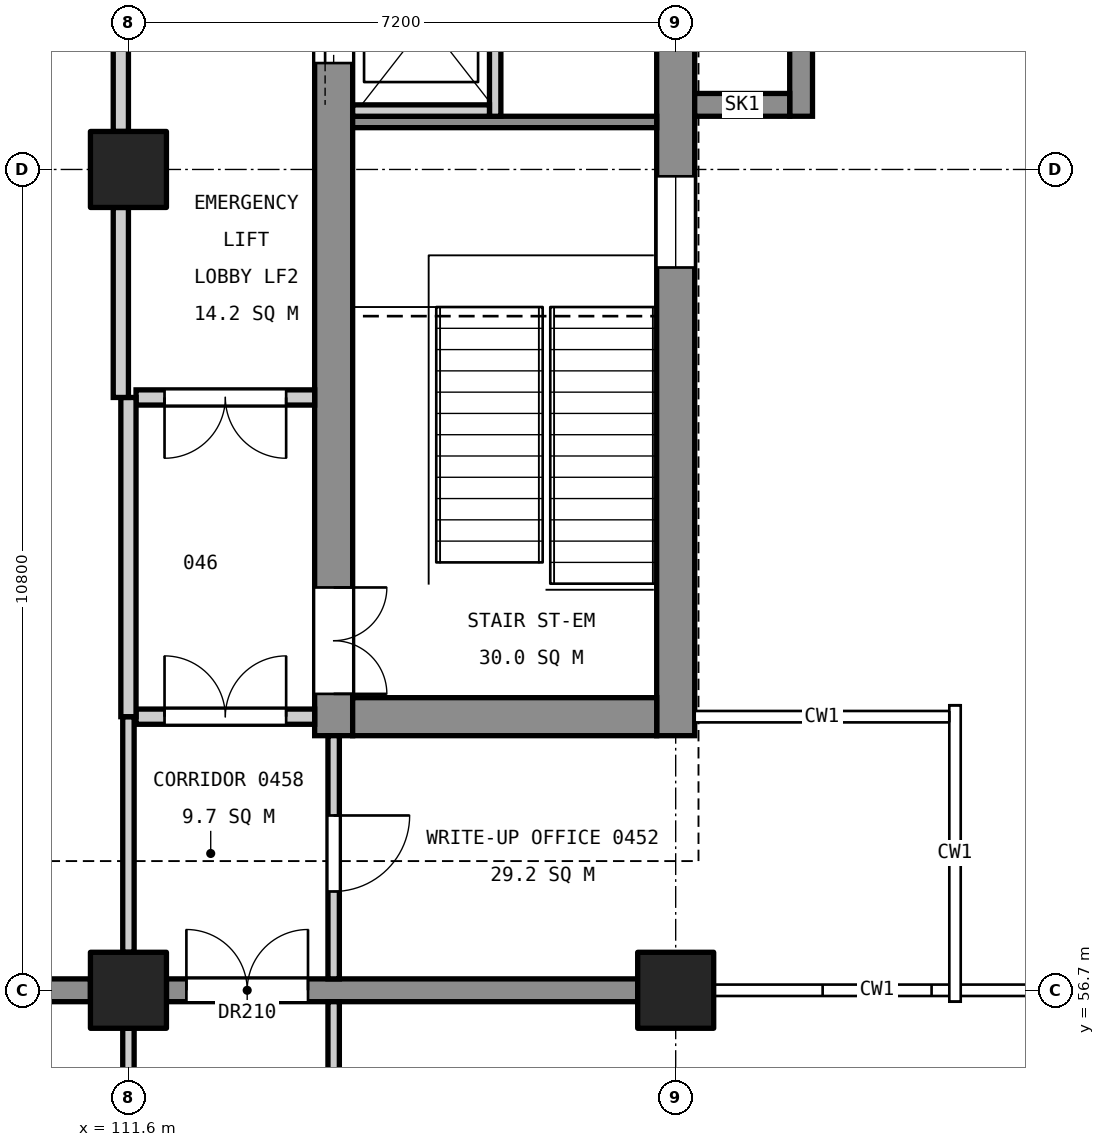
"""IFC4 building model, lengths in metres.
Left out: names, types, materials, properties, quantities, classifications, styles, units other than length and angle.
Written with IfcOpenShell. Run it as: python <this file> out.ifc"""

import sys

from ifc_helpers import new_model, si_unit, direction, frame, frame_2d, origin, origin_2d, place, context, subcontext, project, spatial, rectangle, extrude, element, fill, save


model = new_model("IFC4")
c1 = context("Model", 3, precision=1e-05, world=origin(), true_north=direction((0.0, 1.0)))
c2 = subcontext(c1, "Body", "Model", "MODEL_VIEW")
j1 = project(units=[si_unit("LENGTHUNIT", "METRE"), si_unit("PLANEANGLEUNIT", "RADIAN")], contexts=[c1])
p1 = place(None, origin())
s1 = spatial("IfcSite", under=j1, at=p1, CompositionType="ELEMENT")
p2 = place(p1, origin())
s2 = spatial("IfcBuilding", under=s1, at=p2, CompositionType="ELEMENT")
p3 = place(p2, frame((0.0, 0.0, 22.2)))
s3 = spatial("IfcBuildingStorey", under=s2, at=p3, CompositionType="ELEMENT", Elevation=22.2)
for number, where, z_axis, x_axis in (
    (1, (118.8, 56.7, 0.0), (0.0, 0.0, 1.0), (1.0, 0.0, 0.0)),
    (2, (111.6, 56.7, 0.0), (0.0, 0.0, 1.0), (1.0, 0.0, 0.0)),
    (3, (111.6, 67.5, 0.0), (0.0, 0.0, 1.0), (1.0, 0.0, 0.0)),
):
    element("IfcColumn", number, at=place(p3, frame(where, z_axis=z_axis, x_axis=x_axis)), inside=s3, PredefinedType="COLUMN", context=c2, shape_type="SweptSolid", body=[
        extrude(rectangle(XDim=1.0, YDim=1.0, at=origin_2d()), origin(), (0.0, 0.0, 1.0), 4.8),
    ])
p4 = place(p3, frame((118.8, 60.05, 0.0), z_axis=(0.0, 0.0, 1.0), x_axis=(0.0, 1.0, 0.0)))
e4 = element("IfcWall", 4, at=p4, inside=s3, PredefinedType="SHEAR", context=c2, shape_type="SweptSolid", body=[
    extrude(rectangle(XDim=14.9, YDim=0.5, at=frame_2d((7.45, 0.0))), origin(), (0.0, 0.0, 1.0), 4.55),
])
p5 = place(p4, frame((6.16, 0.0, 3.4)))
e5 = element("IfcOpeningElement", 5, at=p5, cuts=e4, PredefinedType="OPENING", context=c2, shape_type="SweptSolid", body=[
    extrude(rectangle(XDim=1.2, YDim=0.9, at=frame_2d((0.6, 0.45))), frame((0.0, 0.26, 0.0), z_axis=(0.0, -1.0, 0.0), x_axis=(1.0, 0.0, 0.0)), (0.0, 0.0, 1.0), 0.52),
])
p6 = place(p3, frame((114.3, 60.05, 0.0), z_axis=(0.0, 0.0, 1.0), x_axis=(0.0, 1.0, 0.0)))
e6 = element("IfcWall", 6, at=p6, inside=s3, PredefinedType="SHEAR", context=c2, shape_type="SweptSolid", body=[
    extrude(rectangle(XDim=14.9, YDim=0.5, at=frame_2d((7.45, 0.0))), origin(), (0.0, 0.0, 1.0), 4.55),
])
p7 = place(p6, frame((0.55, 0.0, 0.0)))
e7 = element("IfcOpeningElement", 7, at=p7, cuts=e6, PredefinedType="OPENING", context=c2, shape_type="SweptSolid", body=[
    extrude(rectangle(XDim=1.4, YDim=2.1, at=frame_2d((0.7, 1.05))), frame((0.0, 0.26, 0.0), z_axis=(0.0, -1.0, 0.0), x_axis=(1.0, 0.0, 0.0)), (0.0, 0.0, 1.0), 0.52),
])
p8 = place(p6, frame((8.85, 0.0, 0.0)))
e8 = element("IfcOpeningElement", 8, at=p8, cuts=e6, PredefinedType="OPENING", context=c2, shape_type="SweptSolid", body=[
    extrude(rectangle(XDim=1.1, YDim=2.1, at=frame_2d((0.55, 1.05))), frame((0.0, 0.26, 0.0), z_axis=(0.0, -1.0, 0.0), x_axis=(1.0, 0.0, 0.0)), (0.0, 0.0, 1.0), 0.52),
])
p9 = place(p6, frame((11.4, 0.0, 0.0)))
e9 = element("IfcOpeningElement", 9, at=p9, cuts=e6, PredefinedType="OPENING", context=c2, shape_type="SweptSolid", body=[
    extrude(rectangle(XDim=1.1, YDim=2.1, at=frame_2d((0.55, 1.05))), frame((0.0, 0.26, 0.0), z_axis=(0.0, -1.0, 0.0), x_axis=(1.0, 0.0, 0.0)), (0.0, 0.0, 1.0), 0.52),
])
p10 = place(p3, frame((118.55, 60.3, 0.0), z_axis=(0.0, 0.0, 1.0), x_axis=(-1.0, 0.0, 0.0)))
e10 = element("IfcWall", 10, at=p10, inside=s3, PredefinedType="SHEAR", context=c2, shape_type="SweptSolid", body=[
    extrude(rectangle(XDim=4.0, YDim=0.5, at=frame_2d((2.0, 0.0))), origin(), (0.0, 0.0, 1.0), 4.55),
])
p11 = place(p3, frame((120.45, 68.2, 0.0), z_axis=(0.0, 0.0, 1.0), x_axis=(0.0, 1.0, 0.0)))
e11 = element("IfcWall", 11, at=p11, inside=s3, PredefinedType="SHEAR", context=c2, shape_type="SweptSolid", body=[
    extrude(rectangle(XDim=5.1, YDim=0.3, at=frame_2d((2.55, 0.0))), origin(), (0.0, 0.0, 1.0), 4.8),
])
p12 = place(p11, frame((1.65, 0.0, 3.0)))
e12 = element("IfcOpeningElement", 12, at=p12, cuts=e11, PredefinedType="OPENING", context=c2, shape_type="SweptSolid", body=[
    extrude(rectangle(XDim=1.8, YDim=1.2, at=frame_2d((0.9, 0.6))), frame((0.0, 0.16, 0.0), z_axis=(0.0, -1.0, 0.0), x_axis=(1.0, 0.0, 0.0)), (0.0, 0.0, 1.0), 0.32),
])
p13 = place(p3, frame((119.05, 68.35, 0.0), z_axis=(0.0, 0.0, 1.0), x_axis=(1.0, 0.0, 0.0)))
e13 = element("IfcWall", 13, at=p13, inside=s3, PredefinedType="SHEAR", context=c2, shape_type="SweptSolid", body=[
    extrude(rectangle(XDim=1.25, YDim=0.3, at=frame_2d((0.625, 0.0))), origin(), (0.0, 0.0, 1.0), 4.8),
])
p14 = place(p3, frame((118.3, 56.7, 0.0), z_axis=(0.0, 0.0, 1.0), x_axis=(-1.0, 0.0, 0.0)))
e14 = element("IfcWall", 14, at=p14, inside=s3, PredefinedType="SHEAR", context=c2, shape_type="SweptSolid", body=[
    extrude(rectangle(XDim=6.2, YDim=0.3, at=frame_2d((3.1, 0.0))), origin(), (0.0, 0.0, 1.0), 4.55),
])
p15 = place(p14, frame((4.337, 0.0, 0.0)))
e15 = element("IfcOpeningElement", 15, at=p15, cuts=e14, PredefinedType="OPENING", context=c2, shape_type="SweptSolid", body=[
    extrude(rectangle(XDim=1.6, YDim=2.1, at=frame_2d((0.8, 1.05))), frame((0.0, 0.16, 0.0), z_axis=(0.0, -1.0, 0.0), x_axis=(1.0, 0.0, 0.0)), (0.0, 0.0, 1.0), 0.32),
])
p16 = place(p3, frame((111.1, 56.7, 0.0), z_axis=(0.0, 0.0, 1.0), x_axis=(-1.0, 0.0, 0.0)))
e16 = element("IfcWall", 16, at=p16, inside=s3, PredefinedType="SHEAR", context=c2, shape_type="SweptSolid", body=[
    extrude(rectangle(XDim=9.8, YDim=0.3, at=frame_2d((4.9, 0.0))), origin(), (0.0, 0.0, 1.0), 4.55),
])
p17 = place(p3, frame((118.55, 68.125, 0.0), z_axis=(0.0, 0.0, 1.0), x_axis=(-1.0, 0.0, 0.0)))
e17 = element("IfcWall", 17, at=p17, inside=s3, PredefinedType="SOLIDWALL", context=c2, shape_type="SweptSolid", body=[
    extrude(rectangle(XDim=4.0, YDim=0.15, at=frame_2d((2.0, 0.0))), origin(), (0.0, 0.0, 1.0), 4.55),
])
p18 = place(p3, frame((116.425, 68.2, 0.0), z_axis=(0.0, 0.0, 1.0), x_axis=(0.0, 1.0, 0.0)))
e18 = element("IfcWall", 18, at=p18, inside=s3, PredefinedType="SOLIDWALL", context=c2, shape_type="SweptSolid", body=[
    extrude(rectangle(XDim=2.5, YDim=0.15, at=frame_2d((1.25, 0.0))), origin(), (0.0, 0.0, 1.0), 4.8),
])
p19 = place(p3, frame((116.35, 68.275, 0.0), z_axis=(0.0, 0.0, 1.0), x_axis=(-1.0, 0.0, 0.0)))
e19 = element("IfcWall", 19, at=p19, inside=s3, PredefinedType="SOLIDWALL", context=c2, shape_type="SweptSolid", body=[
    extrude(rectangle(XDim=1.8, YDim=0.15, at=frame_2d((0.9, 0.0))), origin(), (0.0, 0.0, 1.0), 4.8),
])
p20 = place(p3, frame((114.3, 46.15, 0.0), z_axis=(0.0, 0.0, 1.0), x_axis=(0.0, 1.0, 0.0)))
e20 = element("IfcWall", 20, at=p20, inside=s3, PredefinedType="PARTITIONING", context=c2, shape_type="SweptSolid", body=[
    extrude(rectangle(XDim=10.4, YDim=0.15, at=frame_2d((5.2, 0.0))), origin(), (0.0, 0.0, 1.0), 3.55),
])
p21 = place(p20, frame((4.65, 0.0, 0.0)))
e21 = element("IfcOpeningElement", 21, at=p21, cuts=e20, PredefinedType="OPENING", context=c2, shape_type="SweptSolid", body=[
    extrude(rectangle(XDim=1.0, YDim=2.1, at=frame_2d((0.5, 1.05))), frame((0.0, 0.085, 0.0), z_axis=(0.0, -1.0, 0.0), x_axis=(1.0, 0.0, 0.0)), (0.0, 0.0, 1.0), 0.17),
])
p22 = place(p3, frame((114.3, 56.85, 0.0), z_axis=(0.0, 0.0, 1.0), x_axis=(0.0, 1.0, 0.0)))
e22 = element("IfcWall", 22, at=p22, inside=s3, PredefinedType="PARTITIONING", context=c2, shape_type="SweptSolid", body=[
    extrude(rectangle(XDim=3.2, YDim=0.15, at=frame_2d((1.6, 0.0))), origin(), (0.0, 0.0, 1.0), 3.55),
])
p23 = place(p22, frame((1.15, 0.0, 0.0)))
e23 = element("IfcOpeningElement", 23, at=p23, cuts=e22, PredefinedType="OPENING", context=c2, shape_type="SweptSolid", body=[
    extrude(rectangle(XDim=1.0, YDim=2.1, at=frame_2d((0.5, 1.05))), frame((0.0, 0.085, 0.0), z_axis=(0.0, -1.0, 0.0), x_axis=(1.0, 0.0, 0.0)), (0.0, 0.0, 1.0), 0.17),
])
p24 = place(p3, frame((114.05, 60.3, 0.0), z_axis=(0.0, 0.0, 1.0), x_axis=(-1.0, 0.0, 0.0)))
e24 = element("IfcWall", 24, at=p24, inside=s3, PredefinedType="PARTITIONING", context=c2, shape_type="SweptSolid", body=[
    extrude(rectangle(XDim=2.35, YDim=0.2, at=frame_2d((1.175, 0.0))), origin(), (0.0, 0.0, 1.0), 3.85),
])
p25 = place(p24, frame((0.375, 0.0, 0.0)))
e25 = element("IfcOpeningElement", 25, at=p25, cuts=e24, PredefinedType="OPENING", context=c2, shape_type="SweptSolid", body=[
    extrude(rectangle(XDim=1.6, YDim=2.1, at=frame_2d((0.8, 1.05))), frame((0.0, 0.11, 0.0), z_axis=(0.0, -1.0, 0.0), x_axis=(1.0, 0.0, 0.0)), (0.0, 0.0, 1.0), 0.22),
])
p26 = place(p3, frame((114.05, 64.5, 0.0), z_axis=(0.0, 0.0, 1.0), x_axis=(-1.0, 0.0, 0.0)))
e26 = element("IfcWall", 26, at=p26, inside=s3, PredefinedType="PARTITIONING", context=c2, shape_type="SweptSolid", body=[
    extrude(rectangle(XDim=2.35, YDim=0.2, at=frame_2d((1.175, 0.0))), origin(), (0.0, 0.0, 1.0), 3.55),
])
p27 = place(p26, frame((0.375, 0.0, 0.0)))
e27 = element("IfcOpeningElement", 27, at=p27, cuts=e26, PredefinedType="OPENING", context=c2, shape_type="SweptSolid", body=[
    extrude(rectangle(XDim=1.6, YDim=2.1, at=frame_2d((0.8, 1.05))), frame((0.0, 0.11, 0.0), z_axis=(0.0, -1.0, 0.0), x_axis=(1.0, 0.0, 0.0)), (0.0, 0.0, 1.0), 0.22),
])
p28 = place(p3, frame((111.6, 46.4, 0.0), z_axis=(0.0, 0.0, 1.0), x_axis=(0.0, 1.0, 0.0)))
e28 = element("IfcWall", 28, at=p28, inside=s3, PredefinedType="PARTITIONING", context=c2, shape_type="SweptSolid", body=[
    extrude(rectangle(XDim=9.8, YDim=0.15, at=frame_2d((4.9, 0.0))), origin(), (0.0, 0.0, 1.0), 3.55),
])
p29 = place(p28, frame((4.3, 0.0, 0.0)))
e29 = element("IfcOpeningElement", 29, at=p29, cuts=e28, PredefinedType="OPENING", context=c2, shape_type="SweptSolid", body=[
    extrude(rectangle(XDim=1.2, YDim=2.1, at=frame_2d((0.6, 1.05))), frame((0.0, 0.085, 0.0), z_axis=(0.0, -1.0, 0.0), x_axis=(1.0, 0.0, 0.0)), (0.0, 0.0, 1.0), 0.17),
])
p30 = place(p3, frame((111.6, 57.2, 0.0), z_axis=(0.0, 0.0, 1.0), x_axis=(0.0, 1.0, 0.0)))
e30 = element("IfcWall", 30, at=p30, inside=s3, PredefinedType="PARTITIONING", context=c2, shape_type="SweptSolid", body=[
    extrude(rectangle(XDim=3.1, YDim=0.15, at=frame_2d((1.55, 0.0))), origin(), (0.0, 0.0, 1.0), 3.55),
])
p31 = place(p3, frame((111.6, 60.3, 0.0), z_axis=(0.0, 0.0, 1.0), x_axis=(0.0, 1.0, 0.0)))
e31 = element("IfcWall", 31, at=p31, inside=s3, PredefinedType="PARTITIONING", context=c2, shape_type="SweptSolid", body=[
    extrude(rectangle(XDim=4.2, YDim=0.2, at=frame_2d((2.1, 0.0))), origin(), (0.0, 0.0, 1.0), 3.55),
])
p32 = place(p3, frame((111.5, 64.5, 0.0), z_axis=(0.0, 0.0, 1.0), x_axis=(0.0, 1.0, 0.0)))
e32 = element("IfcWall", 32, at=p32, inside=s3, PredefinedType="PARTITIONING", context=c2, shape_type="SweptSolid", body=[
    extrude(rectangle(XDim=2.5, YDim=0.2, at=frame_2d((1.25, 0.0))), origin(), (0.0, 0.0, 1.0), 3.55),
])
p33 = place(p3, frame((111.5, 68.0, 0.0), z_axis=(0.0, 0.0, 1.0), x_axis=(0.0, 1.0, 0.0)))
e33 = element("IfcWall", 33, at=p33, inside=s3, PredefinedType="PARTITIONING", context=c2, shape_type="SweptSolid", body=[
    extrude(rectangle(XDim=2.8, YDim=0.2, at=frame_2d((1.4, 0.0))), origin(), (0.0, 0.0, 1.0), 3.55),
])
p34 = place(p7, frame((1.4, 0.0, 0.0), z_axis=(0.0, 0.0, 1.0), x_axis=(-1.0, 0.0, 0.0)))
e34 = element("IfcDoor", 34, at=p34, inside=s3, OperationType="DOUBLE_DOOR_SINGLE_SWING", PredefinedType="DOOR", context=c2, shape_type="SweptSolid", body=[
    extrude(rectangle(XDim=1.4, YDim=2.1, at=frame_2d((0.7, 1.05))), frame((0.0, 0.025, 0.0), z_axis=(0.0, -1.0, 0.0), x_axis=(1.0, 0.0, 0.0)), (0.0, 0.0, 1.0), 0.05),
])
fill(e7, e34)
p35 = place(p8, origin())
e35 = element("IfcDoor", 35, at=p35, inside=s3, OperationType="SLIDING_TO_LEFT", PredefinedType="DOOR", context=c2, shape_type="SweptSolid", body=[
    extrude(rectangle(XDim=1.1, YDim=2.1, at=frame_2d((0.55, 1.05))), frame((0.0, 0.025, 0.0), z_axis=(0.0, -1.0, 0.0), x_axis=(1.0, 0.0, 0.0)), (0.0, 0.0, 1.0), 0.05),
])
fill(e8, e35)
p36 = place(p5, origin())
e36 = element("IfcWindow", 36, at=p36, inside=s3, PartitioningType="SINGLE_PANEL", PredefinedType="WINDOW", context=c2, shape_type="SweptSolid", body=[
    extrude(rectangle(XDim=1.2, YDim=0.9, at=frame_2d((0.6, 0.45))), frame((0.0, 0.03, 0.0), z_axis=(0.0, -1.0, 0.0), x_axis=(1.0, 0.0, 0.0)), (0.0, 0.0, 1.0), 0.06),
])
fill(e5, e36)
p37 = place(p23, frame((1.0, 0.0, 0.0), z_axis=(0.0, 0.0, 1.0), x_axis=(-1.0, 0.0, 0.0)))
e37 = element("IfcDoor", 37, at=p37, inside=s3, OperationType="SINGLE_SWING_LEFT", PredefinedType="DOOR", context=c2, shape_type="SweptSolid", body=[
    extrude(rectangle(XDim=1.0, YDim=2.1, at=frame_2d((0.5, 1.05))), frame((0.0, 0.025, 0.0), z_axis=(0.0, -1.0, 0.0), x_axis=(1.0, 0.0, 0.0)), (0.0, 0.0, 1.0), 0.05),
])
fill(e23, e37)
p38 = place(p25, frame((1.6, 0.0, 0.0), z_axis=(0.0, 0.0, 1.0), x_axis=(-1.0, 0.0, 0.0)))
e38 = element("IfcDoor", 38, at=p38, inside=s3, OperationType="DOUBLE_DOOR_SINGLE_SWING", PredefinedType="DOOR", context=c2, shape_type="SweptSolid", body=[
    extrude(rectangle(XDim=1.6, YDim=2.1, at=frame_2d((0.8, 1.05))), frame((0.0, 0.025, 0.0), z_axis=(0.0, -1.0, 0.0), x_axis=(1.0, 0.0, 0.0)), (0.0, 0.0, 1.0), 0.05),
])
fill(e25, e38)
p39 = place(p27, origin())
e39 = element("IfcDoor", 39, at=p39, inside=s3, OperationType="DOUBLE_DOOR_SINGLE_SWING", PredefinedType="DOOR", context=c2, shape_type="SweptSolid", body=[
    extrude(rectangle(XDim=1.6, YDim=2.1, at=frame_2d((0.8, 1.05))), frame((0.0, 0.025, 0.0), z_axis=(0.0, -1.0, 0.0), x_axis=(1.0, 0.0, 0.0)), (0.0, 0.0, 1.0), 0.05),
])
fill(e27, e39)
p40 = place(p15, frame((1.6, 0.0, 0.0), z_axis=(0.0, 0.0, 1.0), x_axis=(-1.0, 0.0, 0.0)))
e40 = element("IfcDoor", 40, at=p40, inside=s3, OperationType="DOUBLE_DOOR_SINGLE_SWING", PredefinedType="DOOR", context=c2, shape_type="SweptSolid", body=[
    extrude(rectangle(XDim=1.6, YDim=2.1, at=frame_2d((0.8, 1.05))), frame((0.0, 0.025, 0.0), z_axis=(0.0, -1.0, 0.0), x_axis=(1.0, 0.0, 0.0)), (0.0, 0.0, 1.0), 0.05),
])
fill(e15, e40)
save(model, sys.argv[1])
